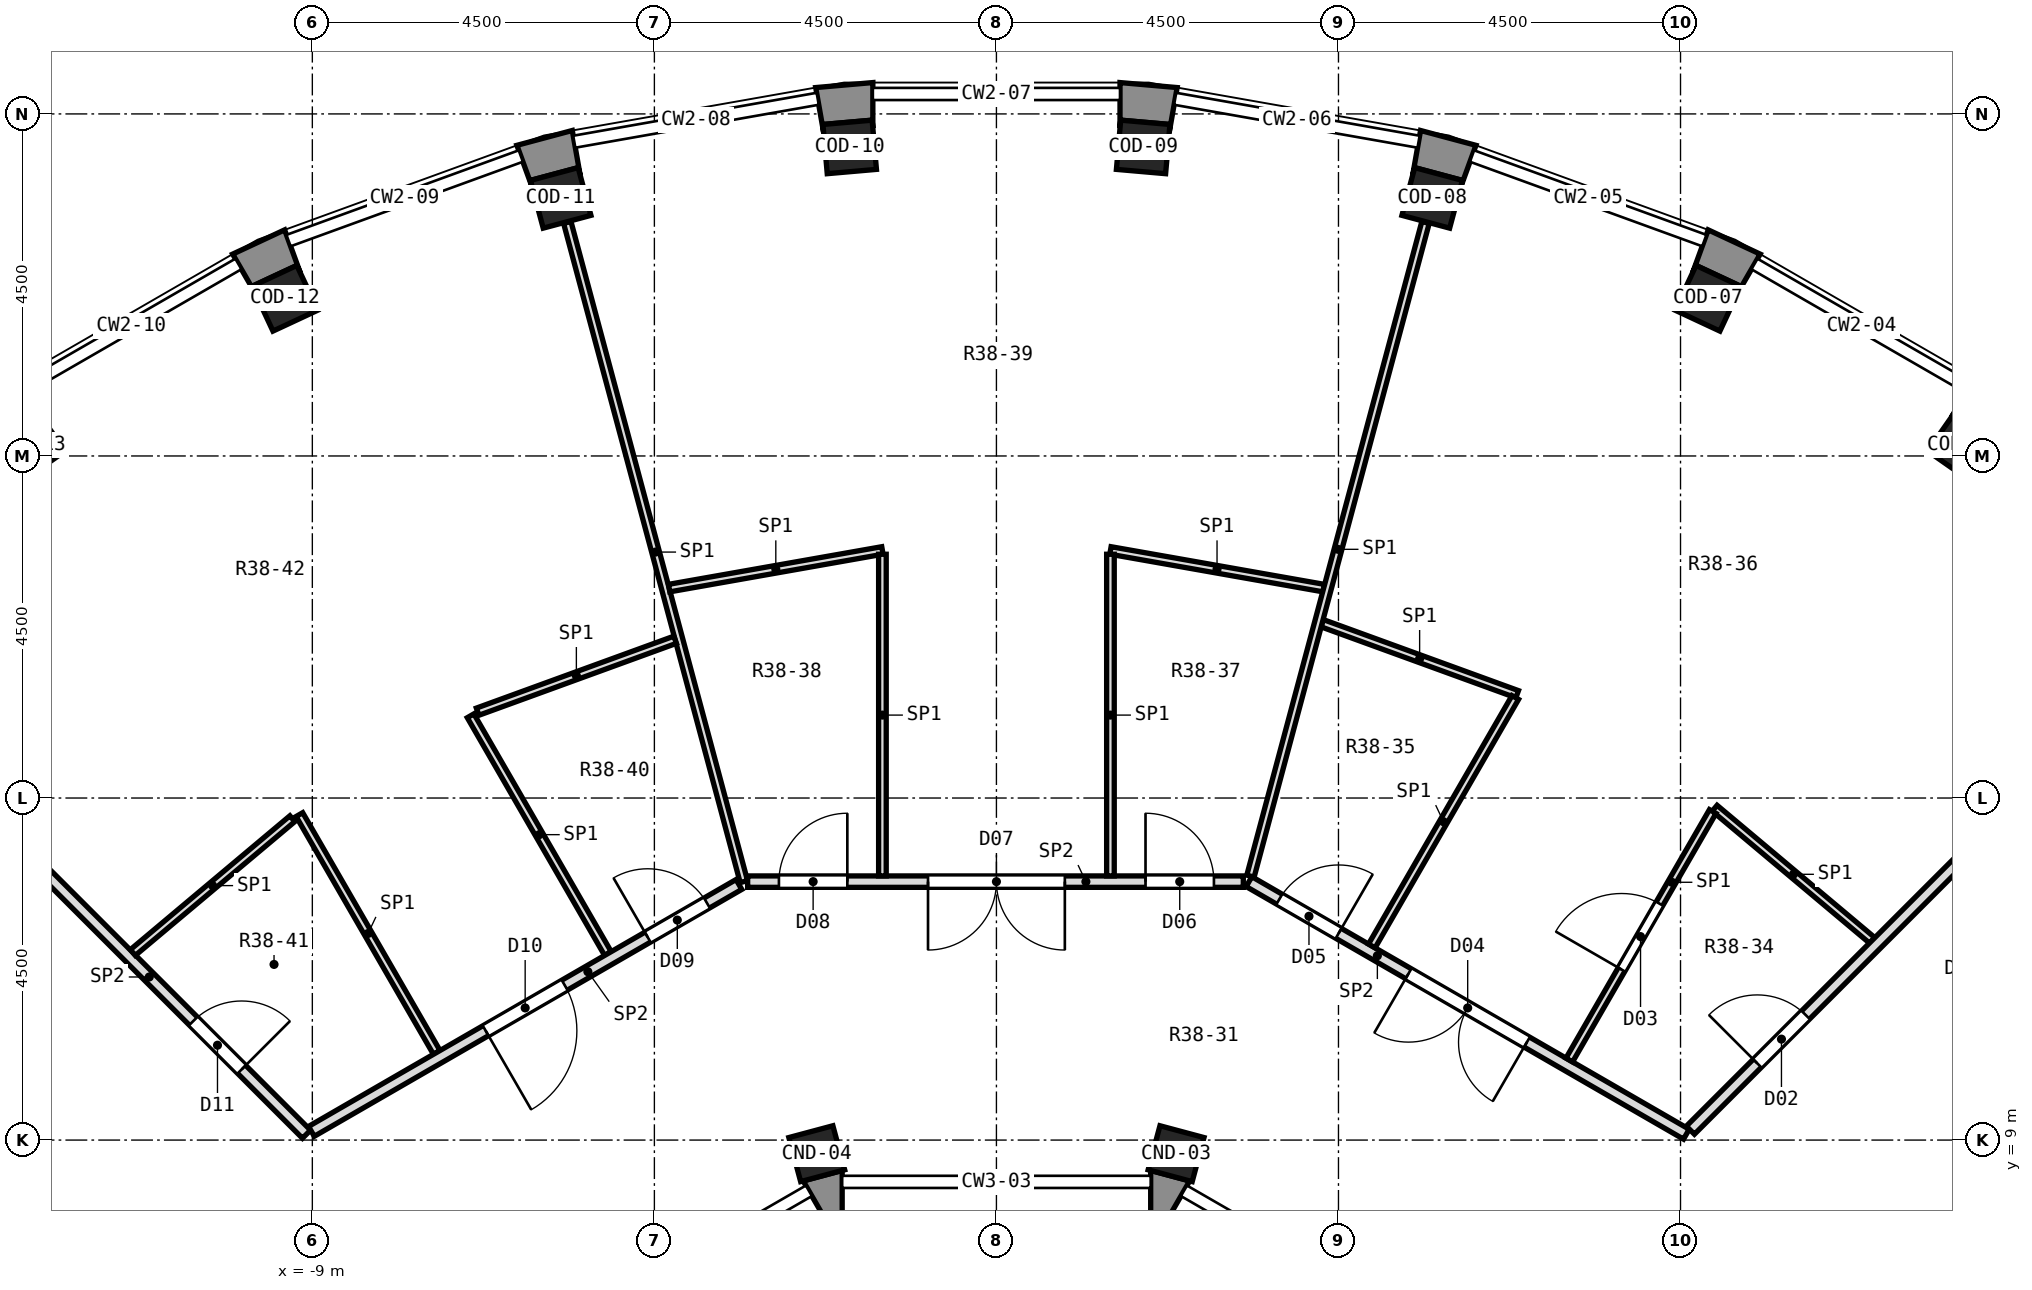
"""IFC4 building model, lengths in metres.
Left out: names, types, materials, properties, quantities, classifications, styles, units other than length and angle.
Written with IfcOpenShell. Run it as: python <this file> out.ifc"""

import sys

from ifc_helpers import new_model, si_unit, direction, frame, frame_2d, origin, origin_2d, place, context, subcontext, project, spatial, polyline, rectangle, outline, extrude, element, fill, save


model = new_model("IFC4")
c1 = context("Model", 3, precision=1e-05, world=origin(), true_north=direction((0.0, 1.0)))
c2 = subcontext(c1, "Body", "Model", "MODEL_VIEW")
j1 = project(units=[si_unit("LENGTHUNIT", "METRE"), si_unit("PLANEANGLEUNIT", "RADIAN")], contexts=[c1])
p1 = place(None, origin())
s1 = spatial("IfcSite", under=j1, at=p1, CompositionType="ELEMENT")
p2 = place(p1, origin())
s2 = spatial("IfcBuilding", under=s1, at=p2, CompositionType="ELEMENT")
p3 = place(p2, frame((0.0, 0.0, 279.2)))
s3 = spatial("IfcBuildingStorey", under=s2, at=p3, CompositionType="ELEMENT", Elevation=279.2)
for number, where, z_axis, x_axis in (
    (1, (12.705, 18.144, 0.0), (0.0, 0.0, 1.0), (0.574, 0.819, 0.0)),
    (2, (9.361, 20.075, 0.0), (0.0, 0.0, 1.0), (0.423, 0.906, 0.0)),
    (3, (5.733, 21.395, 0.0), (0.0, 0.0, 1.0), (0.259, 0.966, 0.0)),
    (4, (1.93, 22.066, 0.0), (0.0, 0.0, 1.0), (0.087, 0.996, 0.0)),
    (5, (-1.93, 22.066, 0.0), (0.0, 0.0, 1.0), (-0.087, 0.996, 0.0)),
    (6, (-5.733, 21.395, 0.0), (0.0, 0.0, 1.0), (-0.259, 0.966, 0.0)),
    (7, (-9.361, 20.075, 0.0), (0.0, 0.0, 1.0), (-0.423, 0.906, 0.0)),
    (8, (-12.705, 18.144, 0.0), (0.0, 0.0, 1.0), (-0.574, 0.819, 0.0)),
):
    element("IfcColumn", number, at=place(p3, frame(where, z_axis=z_axis, x_axis=x_axis)), inside=s3, PredefinedType="COLUMN", context=c2, shape_type="SweptSolid", body=[
        extrude(rectangle(XDim=0.65, YDim=0.65, at=origin_2d()), origin(), (0.0, 0.0, 1.0), 5.0),
    ])
for number, where, z_axis, x_axis in (
    (9, (2.364, 8.821, 0.0), (0.0, 0.0, 1.0), (0.259, 0.966, 0.0)),
    (10, (-2.364, 8.821, 0.0), (0.0, 0.0, 1.0), (-0.259, 0.966, 0.0)),
):
    element("IfcColumn", number, at=place(p3, frame(where, z_axis=z_axis, x_axis=x_axis)), inside=s3, PredefinedType="COLUMN", context=c2, shape_type="SweptSolid", body=[
        extrude(rectangle(XDim=0.6, YDim=0.6, at=origin_2d()), origin(), (0.0, 0.0, 1.0), 5.0),
    ])
p4 = place(p3, origin())
e11 = element("IfcWall", 11, at=p4, inside=s3, PredefinedType="SOLIDWALL", context=c2, shape_type="SweptSolid", body=[
    extrude(outline(polyline([(12.864, 19.03), (12.564, 18.51), (12.625, 18.597), (13.157, 18.224), (13.097, 18.137), (13.482, 18.597), (12.864, 19.03)])), origin(), (0.0, 0.0, 1.0), 4.45),
])
p5 = place(p3, origin())
e12 = element("IfcWall", 12, at=p5, inside=s3, PredefinedType="SOLIDWALL", context=c2, shape_type="SweptSolid", body=[
    extrude(outline(polyline([(10.048, 20.656), (9.364, 20.975), (9.159, 20.411), (9.204, 20.507), (9.793, 20.232), (9.748, 20.136), (10.048, 20.656)])), origin(), (0.0, 0.0, 1.0), 4.45),
])
p6 = place(p3, origin())
e13 = element("IfcWall", 13, at=p6, inside=s3, PredefinedType="SOLIDWALL", context=c2, shape_type="SweptSolid", body=[
    extrude(outline(polyline([(5.58, 22.282), (5.476, 21.691), (5.503, 21.793), (6.131, 21.625), (6.104, 21.523), (6.309, 22.087), (5.58, 22.282)])), origin(), (0.0, 0.0, 1.0), 4.45),
])
p7 = place(p3, origin())
e14 = element("IfcWall", 14, at=p7, inside=s3, PredefinedType="SOLIDWALL", context=c2, shape_type="SweptSolid", body=[
    extrude(outline(polyline([(2.378, 22.847), (1.626, 22.913), (1.626, 22.312), (1.635, 22.418), (2.283, 22.361), (2.273, 22.256), (2.378, 22.847)])), origin(), (0.0, 0.0, 1.0), 4.45),
])
p8 = place(p3, origin())
e15 = element("IfcWall", 15, at=p8, inside=s3, PredefinedType="SOLIDWALL", context=c2, shape_type="SweptSolid", body=[
    extrude(outline(polyline([(-1.626, 22.913), (-2.378, 22.847), (-2.273, 22.256), (-2.283, 22.361), (-1.635, 22.418), (-1.626, 22.312), (-1.626, 22.913)])), origin(), (0.0, 0.0, 1.0), 4.45),
])
p9 = place(p3, origin())
e16 = element("IfcWall", 16, at=p9, inside=s3, PredefinedType="SOLIDWALL", context=c2, shape_type="SweptSolid", body=[
    extrude(outline(polyline([(-6.309, 22.087), (-6.104, 21.523), (-6.131, 21.625), (-5.503, 21.793), (-5.476, 21.691), (-5.58, 22.282), (-6.309, 22.087)])), origin(), (0.0, 0.0, 1.0), 4.45),
])
p10 = place(p3, origin())
e17 = element("IfcWall", 17, at=p10, inside=s3, PredefinedType="SOLIDWALL", context=c2, shape_type="SweptSolid", body=[
    extrude(outline(polyline([(-9.364, 20.975), (-10.048, 20.656), (-9.748, 20.136), (-9.793, 20.232), (-9.204, 20.507), (-9.159, 20.411), (-9.364, 20.975)])), origin(), (0.0, 0.0, 1.0), 4.45),
])
p11 = place(p3, origin())
e18 = element("IfcWall", 18, at=p11, inside=s3, PredefinedType="SOLIDWALL", context=c2, shape_type="SweptSolid", body=[
    extrude(outline(polyline([(2.029, 8.6), (2.029, 8.0), (2.242, 7.943), (2.542, 8.462), (2.029, 8.6)])), origin(), (0.0, 0.0, 1.0), 4.45),
])
p12 = place(p3, origin())
e19 = element("IfcWall", 19, at=p12, inside=s3, PredefinedType="SOLIDWALL", context=c2, shape_type="SweptSolid", body=[
    extrude(outline(polyline([(-2.542, 8.462), (-2.242, 7.943), (-2.029, 8.0), (-2.029, 8.6), (-2.542, 8.462)])), origin(), (0.0, 0.0, 1.0), 4.45),
])
p13 = place(p3, frame((-5.646, 21.072, 0.0), z_axis=(0.0, 0.0, 1.0), x_axis=(0.258728835498, -0.965949993365, 0.0)))
e20 = element("IfcWall", 20, at=p13, inside=s3, PredefinedType="PARTITIONING", context=c2, shape_type="SweptSolid", body=[
    extrude(rectangle(XDim=8.978, YDim=0.1, at=frame_2d((4.489, 0.0))), origin(), (0.0, 0.0, 1.0), 4.45),
])
p14 = place(p3, frame((-9.17, 13.282, 0.0), z_axis=(0.0, 0.0, 1.0), x_axis=(0.49998372882, -0.866034797751, 0.0)))
e21 = element("IfcWall", 21, at=p14, inside=s3, PredefinedType="PARTITIONING", context=c2, shape_type="SweptSolid", body=[
    extrude(rectangle(XDim=3.613, YDim=0.1, at=frame_2d((1.806, 0.0))), origin(), (0.0, 0.0, 1.0), 4.45),
])
p15 = place(p3, frame((-6.918, 14.582, 0.0), z_axis=(0.0, 0.0, 1.0), x_axis=(0.500071521611, -0.865984106825, 0.0)))
e22 = element("IfcWall", 22, at=p15, inside=s3, PredefinedType="PARTITIONING", context=c2, shape_type="SweptSolid", body=[
    extrude(rectangle(XDim=3.612, YDim=0.1, at=frame_2d((1.806, 0.0))), origin(), (0.0, 0.0, 1.0), 4.45),
])
p16 = place(p3, frame((-13.215, 13.215, 0.0), z_axis=(0.0, 0.0, 1.0), x_axis=(0.707106781187, -0.707106781187, 0.0)))
e23 = element("IfcWall", 23, at=p16, inside=s3, PredefinedType="PARTITIONING", context=c2, shape_type="SweptSolid", body=[
    extrude(rectangle(XDim=5.852, YDim=0.15, at=frame_2d((2.926, 0.0))), origin(), (0.0, 0.0, 1.0), 4.45),
])
p17 = place(p16, frame((3.746, 0.0, 0.0)))
e24 = element("IfcOpeningElement", 24, at=p17, cuts=e23, PredefinedType="OPENING", context=c2, shape_type="SweptSolid", body=[
    extrude(rectangle(XDim=0.9, YDim=2.1, at=frame_2d((0.45, 1.05))), frame((0.0, 0.087, 0.0), z_axis=(0.0, -1.0, 0.0), x_axis=(1.0, 0.0, 0.0)), (0.0, 0.0, 1.0), 0.174),
])
p18 = place(p3, frame((9.449, 13.366, 0.0), z_axis=(0.0, 0.0, 1.0), x_axis=(0.766094066965, -0.642728465653, 0.0)))
e25 = element("IfcWall", 25, at=p18, inside=s3, PredefinedType="PARTITIONING", context=c2, shape_type="SweptSolid", body=[
    extrude(rectangle(XDim=2.705, YDim=0.1, at=frame_2d((1.353, 0.0))), origin(), (0.0, 0.0, 1.0), 4.45),
])
p19 = place(p3, frame((3.323, 12.4, 0.0), z_axis=(0.0, 0.0, 1.0), x_axis=(0.865961614908, -0.500110469302, 0.0)))
e26 = element("IfcWall", 26, at=p19, inside=s3, PredefinedType="PARTITIONING", context=c2, shape_type="SweptSolid", body=[
    extrude(rectangle(XDim=6.645, YDim=0.15, at=frame_2d((3.322, 0.0))), origin(), (0.0, 0.0, 1.0), 4.45),
])
p20 = place(p19, frame((2.422, 0.0, 0.0)))
e27 = element("IfcOpeningElement", 27, at=p20, cuts=e26, PredefinedType="OPENING", context=c2, shape_type="SweptSolid", body=[
    extrude(rectangle(XDim=1.8, YDim=2.1, at=frame_2d((0.9, 1.05))), frame((0.0, 0.087, 0.0), z_axis=(0.0, -1.0, 0.0), x_axis=(1.0, 0.0, 0.0)), (0.0, 0.0, 1.0), 0.174),
])
p21 = place(p19, frame((0.461, 0.0, 0.0)))
e28 = element("IfcOpeningElement", 28, at=p21, cuts=e26, PredefinedType="OPENING", context=c2, shape_type="SweptSolid", body=[
    extrude(rectangle(XDim=0.9, YDim=2.1, at=frame_2d((0.45, 1.05))), frame((0.0, 0.087, 0.0), z_axis=(0.0, -1.0, 0.0), x_axis=(1.0, 0.0, 0.0)), (0.0, 0.0, 1.0), 0.174),
])
p22 = place(p3, frame((4.285, 15.8, 0.0), z_axis=(0.0, 0.0, 1.0), x_axis=(0.939712477851, -0.34196558156, 0.0)))
e29 = element("IfcWall", 29, at=p22, inside=s3, PredefinedType="PARTITIONING", context=c2, shape_type="SweptSolid", body=[
    extrude(rectangle(XDim=2.731, YDim=0.1, at=frame_2d((1.365, 0.0))), origin(), (0.0, 0.0, 1.0), 4.45),
])
p23 = place(p3, frame((1.5, 16.757, 0.0), z_axis=(0.0, 0.0, 1.0), x_axis=(0.984768889955, -0.173868436975, 0.0)))
e30 = element("IfcWall", 30, at=p23, inside=s3, PredefinedType="PARTITIONING", context=c2, shape_type="SweptSolid", body=[
    extrude(rectangle(XDim=2.849, YDim=0.1, at=frame_2d((1.425, 0.0))), origin(), (0.0, 0.0, 1.0), 4.45),
])
p24 = place(p3, frame((-3.273, 12.4, 0.0), z_axis=(0.0, 0.0, 1.0), x_axis=(1.0, 0.0, 0.0)))
e31 = element("IfcWall", 31, at=p24, inside=s3, PredefinedType="PARTITIONING", context=c2, shape_type="SweptSolid", body=[
    extrude(rectangle(XDim=6.521, YDim=0.15, at=frame_2d((3.26, 0.0))), origin(), (0.0, 0.0, 1.0), 4.45),
])
p25 = place(p24, frame((5.235, 0.0, 0.0)))
e32 = element("IfcOpeningElement", 32, at=p25, cuts=e31, PredefinedType="OPENING", context=c2, shape_type="SweptSolid", body=[
    extrude(rectangle(XDim=0.9, YDim=2.1, at=frame_2d((0.45, 1.05))), frame((0.0, 0.087, 0.0), z_axis=(0.0, -1.0, 0.0), x_axis=(1.0, 0.0, 0.0)), (0.0, 0.0, 1.0), 0.174),
])
p26 = place(p24, frame((2.373, 0.0, 0.0)))
e33 = element("IfcOpeningElement", 33, at=p26, cuts=e31, PredefinedType="OPENING", context=c2, shape_type="SweptSolid", body=[
    extrude(rectangle(XDim=1.8, YDim=2.1, at=frame_2d((0.9, 1.05))), frame((0.0, 0.087, 0.0), z_axis=(0.0, -1.0, 0.0), x_axis=(1.0, 0.0, 0.0)), (0.0, 0.0, 1.0), 0.174),
])
p27 = place(p24, frame((0.412, 0.0, 0.0)))
e34 = element("IfcOpeningElement", 34, at=p27, cuts=e31, PredefinedType="OPENING", context=c2, shape_type="SweptSolid", body=[
    extrude(rectangle(XDim=0.9, YDim=2.1, at=frame_2d((0.45, 1.05))), frame((0.0, 0.087, 0.0), z_axis=(0.0, -1.0, 0.0), x_axis=(1.0, 0.0, 0.0)), (0.0, 0.0, 1.0), 0.174),
])
p28 = place(p3, frame((-4.306, 16.262, 0.0), z_axis=(0.0, 0.0, 1.0), x_axis=(0.984771480107, 0.173853766043, 0.0)))
e35 = element("IfcWall", 35, at=p28, inside=s3, PredefinedType="PARTITIONING", context=c2, shape_type="SweptSolid", body=[
    extrude(rectangle(XDim=2.849, YDim=0.1, at=frame_2d((1.425, 0.0))), origin(), (0.0, 0.0, 1.0), 4.45),
])
p29 = place(p3, frame((-6.825, 14.636, 0.0), z_axis=(0.0, 0.0, 1.0), x_axis=(0.939664442714, 0.342097552023, 0.0)))
e36 = element("IfcWall", 36, at=p29, inside=s3, PredefinedType="PARTITIONING", context=c2, shape_type="SweptSolid", body=[
    extrude(rectangle(XDim=2.765, YDim=0.1, at=frame_2d((1.382, 0.0))), origin(), (0.0, 0.0, 1.0), 4.45),
])
p30 = place(p3, frame((-9.012, 9.115, 0.0), z_axis=(0.0, 0.0, 1.0), x_axis=(0.865967095912, 0.5001009786, 0.0)))
e37 = element("IfcWall", 37, at=p30, inside=s3, PredefinedType="PARTITIONING", context=c2, shape_type="SweptSolid", body=[
    extrude(rectangle(XDim=6.495, YDim=0.15, at=frame_2d((3.248, 0.0))), origin(), (0.0, 0.0, 1.0), 4.45),
])
p31 = place(p30, frame((5.109, 0.0, 0.0)))
e38 = element("IfcOpeningElement", 38, at=p31, cuts=e37, PredefinedType="OPENING", context=c2, shape_type="SweptSolid", body=[
    extrude(rectangle(XDim=0.9, YDim=2.1, at=frame_2d((0.45, 1.05))), frame((0.0, 0.087, 0.0), z_axis=(0.0, -1.0, 0.0), x_axis=(1.0, 0.0, 0.0)), (0.0, 0.0, 1.0), 0.174),
])
p32 = place(p30, frame((2.647, 0.0, 0.0)))
e39 = element("IfcOpeningElement", 39, at=p32, cuts=e37, PredefinedType="OPENING", context=c2, shape_type="SweptSolid", body=[
    extrude(rectangle(XDim=1.2, YDim=2.1, at=frame_2d((0.6, 1.05))), frame((0.0, 0.087, 0.0), z_axis=(0.0, -1.0, 0.0), x_axis=(1.0, 0.0, 0.0)), (0.0, 0.0, 1.0), 0.174),
])
p33 = place(p3, frame((-11.362, 11.467, 0.0), z_axis=(0.0, 0.0, 1.0), x_axis=(0.766083955689, 0.6427405175, 0.0)))
e40 = element("IfcWall", 40, at=p33, inside=s3, PredefinedType="PARTITIONING", context=c2, shape_type="SweptSolid", body=[
    extrude(rectangle(XDim=2.74, YDim=0.1, at=frame_2d((1.37, 0.0))), origin(), (0.0, 0.0, 1.0), 4.45),
])
p34 = place(p3, frame((9.13, 9.13, 0.0), z_axis=(0.0, 0.0, 1.0), x_axis=(0.707106781187, 0.707106781187, 0.0)))
e41 = element("IfcWall", 41, at=p34, inside=s3, PredefinedType="PARTITIONING", context=c2, shape_type="SweptSolid", body=[
    extrude(rectangle(XDim=5.777, YDim=0.15, at=frame_2d((2.888, 0.0))), origin(), (0.0, 0.0, 1.0), 4.45),
])
p35 = place(p34, frame((1.244, 0.0, 0.0)))
e42 = element("IfcOpeningElement", 42, at=p35, cuts=e41, PredefinedType="OPENING", context=c2, shape_type="SweptSolid", body=[
    extrude(rectangle(XDim=0.9, YDim=2.1, at=frame_2d((0.45, 1.05))), frame((0.0, 0.087, 0.0), z_axis=(0.0, -1.0, 0.0), x_axis=(1.0, 0.0, 0.0)), (0.0, 0.0, 1.0), 0.174),
])
p36 = place(p3, frame((7.537, 10.053, 0.0), z_axis=(0.0, 0.0, 1.0), x_axis=(0.499957569697, 0.866049899545, 0.0)))
e43 = element("IfcWall", 43, at=p36, inside=s3, PredefinedType="PARTITIONING", context=c2, shape_type="SweptSolid", body=[
    extrude(rectangle(XDim=3.775, YDim=0.1, at=frame_2d((1.888, 0.0))), origin(), (0.0, 0.0, 1.0), 4.45),
])
p37 = place(p36, frame((1.375, 0.0, 0.0)))
e44 = element("IfcOpeningElement", 44, at=p37, cuts=e43, PredefinedType="OPENING", context=c2, shape_type="SweptSolid", body=[
    extrude(rectangle(XDim=1.0, YDim=2.1, at=frame_2d((0.5, 1.05))), frame((0.0, 0.062, 0.0), z_axis=(0.0, -1.0, 0.0), x_axis=(1.0, 0.0, 0.0)), (0.0, 0.0, 1.0), 0.124),
])
p38 = place(p3, frame((4.938, 11.554, 0.0), z_axis=(0.0, 0.0, 1.0), x_axis=(0.50004158446, 0.866001393654, 0.0)))
e45 = element("IfcWall", 45, at=p38, inside=s3, PredefinedType="PARTITIONING", context=c2, shape_type="SweptSolid", body=[
    extrude(rectangle(XDim=3.775, YDim=0.1, at=frame_2d((1.887, 0.0))), origin(), (0.0, 0.0, 1.0), 4.45),
])
p39 = place(p3, frame((3.342, 12.472, 0.0), z_axis=(0.0, 0.0, 1.0), x_axis=(0.258684909749, 0.965961757767, 0.0)))
e46 = element("IfcWall", 46, at=p39, inside=s3, PredefinedType="PARTITIONING", context=c2, shape_type="SweptSolid", body=[
    extrude(rectangle(XDim=8.903, YDim=0.1, at=frame_2d((4.451, 0.0))), origin(), (0.0, 0.0, 1.0), 4.45),
])
for number, where, z_axis, x_axis in (
    (47, (1.5, 12.475, 0.0), (0.0, 0.0, 1.0), (0.0, 1.0, 0.0)),
    (48, (-1.5, 12.475, 0.0), (0.0, 0.0, 1.0), (0.0, 1.0, 0.0)),
):
    element("IfcWall", number, at=place(p3, frame(where, z_axis=z_axis, x_axis=x_axis)), inside=s3, PredefinedType="PARTITIONING", context=c2, shape_type="SweptSolid", body=[
        extrude(rectangle(XDim=4.232, YDim=0.1, at=frame_2d((2.116, 0.0))), origin(), (0.0, 0.0, 1.0), 4.45),
    ])
p40 = place(p35, origin())
e49 = element("IfcDoor", 49, at=p40, inside=s3, OperationType="SINGLE_SWING_LEFT", PredefinedType="DOOR", context=c2, shape_type="SweptSolid", body=[
    extrude(rectangle(XDim=0.9, YDim=2.1, at=frame_2d((0.45, 1.05))), frame((0.0, 0.025, 0.0), z_axis=(0.0, -1.0, 0.0), x_axis=(1.0, 0.0, 0.0)), (0.0, 0.0, 1.0), 0.05),
])
fill(e42, e49)
p41 = place(p37, origin())
e50 = element("IfcDoor", 50, at=p41, inside=s3, OperationType="SINGLE_SWING_LEFT", PredefinedType="DOOR", context=c2, shape_type="SweptSolid", body=[
    extrude(rectangle(XDim=1.0, YDim=2.1, at=frame_2d((0.5, 1.05))), frame((0.0, 0.025, 0.0), z_axis=(0.0, -1.0, 0.0), x_axis=(1.0, 0.0, 0.0)), (0.0, 0.0, 1.0), 0.05),
])
fill(e44, e50)
p42 = place(p20, frame((1.8, 0.0, 0.0), z_axis=(0.0, 0.0, 1.0), x_axis=(-1.0, 0.0, 0.0)))
e51 = element("IfcDoor", 51, at=p42, inside=s3, OperationType="DOUBLE_DOOR_SINGLE_SWING", PredefinedType="DOOR", context=c2, shape_type="SweptSolid", body=[
    extrude(rectangle(XDim=1.8, YDim=2.1, at=frame_2d((0.9, 1.05))), frame((0.0, 0.025, 0.0), z_axis=(0.0, -1.0, 0.0), x_axis=(1.0, 0.0, 0.0)), (0.0, 0.0, 1.0), 0.05),
])
fill(e27, e51)
p43 = place(p21, origin())
e52 = element("IfcDoor", 52, at=p43, inside=s3, OperationType="SINGLE_SWING_RIGHT", PredefinedType="DOOR", context=c2, shape_type="SweptSolid", body=[
    extrude(rectangle(XDim=0.9, YDim=2.1, at=frame_2d((0.45, 1.05))), frame((0.0, 0.025, 0.0), z_axis=(0.0, -1.0, 0.0), x_axis=(1.0, 0.0, 0.0)), (0.0, 0.0, 1.0), 0.05),
])
fill(e28, e52)
p44 = place(p25, origin())
e53 = element("IfcDoor", 53, at=p44, inside=s3, OperationType="SINGLE_SWING_LEFT", PredefinedType="DOOR", context=c2, shape_type="SweptSolid", body=[
    extrude(rectangle(XDim=0.9, YDim=2.1, at=frame_2d((0.45, 1.05))), frame((0.0, 0.025, 0.0), z_axis=(0.0, -1.0, 0.0), x_axis=(1.0, 0.0, 0.0)), (0.0, 0.0, 1.0), 0.05),
])
fill(e32, e53)
p45 = place(p26, frame((1.8, 0.0, 0.0), z_axis=(0.0, 0.0, 1.0), x_axis=(-1.0, 0.0, 0.0)))
e54 = element("IfcDoor", 54, at=p45, inside=s3, OperationType="DOUBLE_DOOR_SINGLE_SWING", PredefinedType="DOOR", context=c2, shape_type="SweptSolid", body=[
    extrude(rectangle(XDim=1.8, YDim=2.1, at=frame_2d((0.9, 1.05))), frame((0.0, 0.025, 0.0), z_axis=(0.0, -1.0, 0.0), x_axis=(1.0, 0.0, 0.0)), (0.0, 0.0, 1.0), 0.05),
])
fill(e33, e54)
p46 = place(p27, origin())
e55 = element("IfcDoor", 55, at=p46, inside=s3, OperationType="SINGLE_SWING_RIGHT", PredefinedType="DOOR", context=c2, shape_type="SweptSolid", body=[
    extrude(rectangle(XDim=0.9, YDim=2.1, at=frame_2d((0.45, 1.05))), frame((0.0, 0.025, 0.0), z_axis=(0.0, -1.0, 0.0), x_axis=(1.0, 0.0, 0.0)), (0.0, 0.0, 1.0), 0.05),
])
fill(e34, e55)
p47 = place(p31, origin())
e56 = element("IfcDoor", 56, at=p47, inside=s3, OperationType="SINGLE_SWING_LEFT", PredefinedType="DOOR", context=c2, shape_type="SweptSolid", body=[
    extrude(rectangle(XDim=0.9, YDim=2.1, at=frame_2d((0.45, 1.05))), frame((0.0, 0.025, 0.0), z_axis=(0.0, -1.0, 0.0), x_axis=(1.0, 0.0, 0.0)), (0.0, 0.0, 1.0), 0.05),
])
fill(e38, e56)
p48 = place(p32, frame((1.2, 0.0, 0.0), z_axis=(0.0, 0.0, 1.0), x_axis=(-1.0, 0.0, 0.0)))
e57 = element("IfcDoor", 57, at=p48, inside=s3, OperationType="SINGLE_SWING_RIGHT", PredefinedType="DOOR", context=c2, shape_type="SweptSolid", body=[
    extrude(rectangle(XDim=1.2, YDim=2.1, at=frame_2d((0.6, 1.05))), frame((0.0, 0.025, 0.0), z_axis=(0.0, -1.0, 0.0), x_axis=(1.0, 0.0, 0.0)), (0.0, 0.0, 1.0), 0.05),
])
fill(e39, e57)
p49 = place(p17, origin())
e58 = element("IfcDoor", 58, at=p49, inside=s3, OperationType="SINGLE_SWING_RIGHT", PredefinedType="DOOR", context=c2, shape_type="SweptSolid", body=[
    extrude(rectangle(XDim=0.9, YDim=2.1, at=frame_2d((0.45, 1.05))), frame((0.0, 0.025, 0.0), z_axis=(0.0, -1.0, 0.0), x_axis=(1.0, 0.0, 0.0)), (0.0, 0.0, 1.0), 0.05),
])
fill(e24, e58)
save(model, sys.argv[1])
